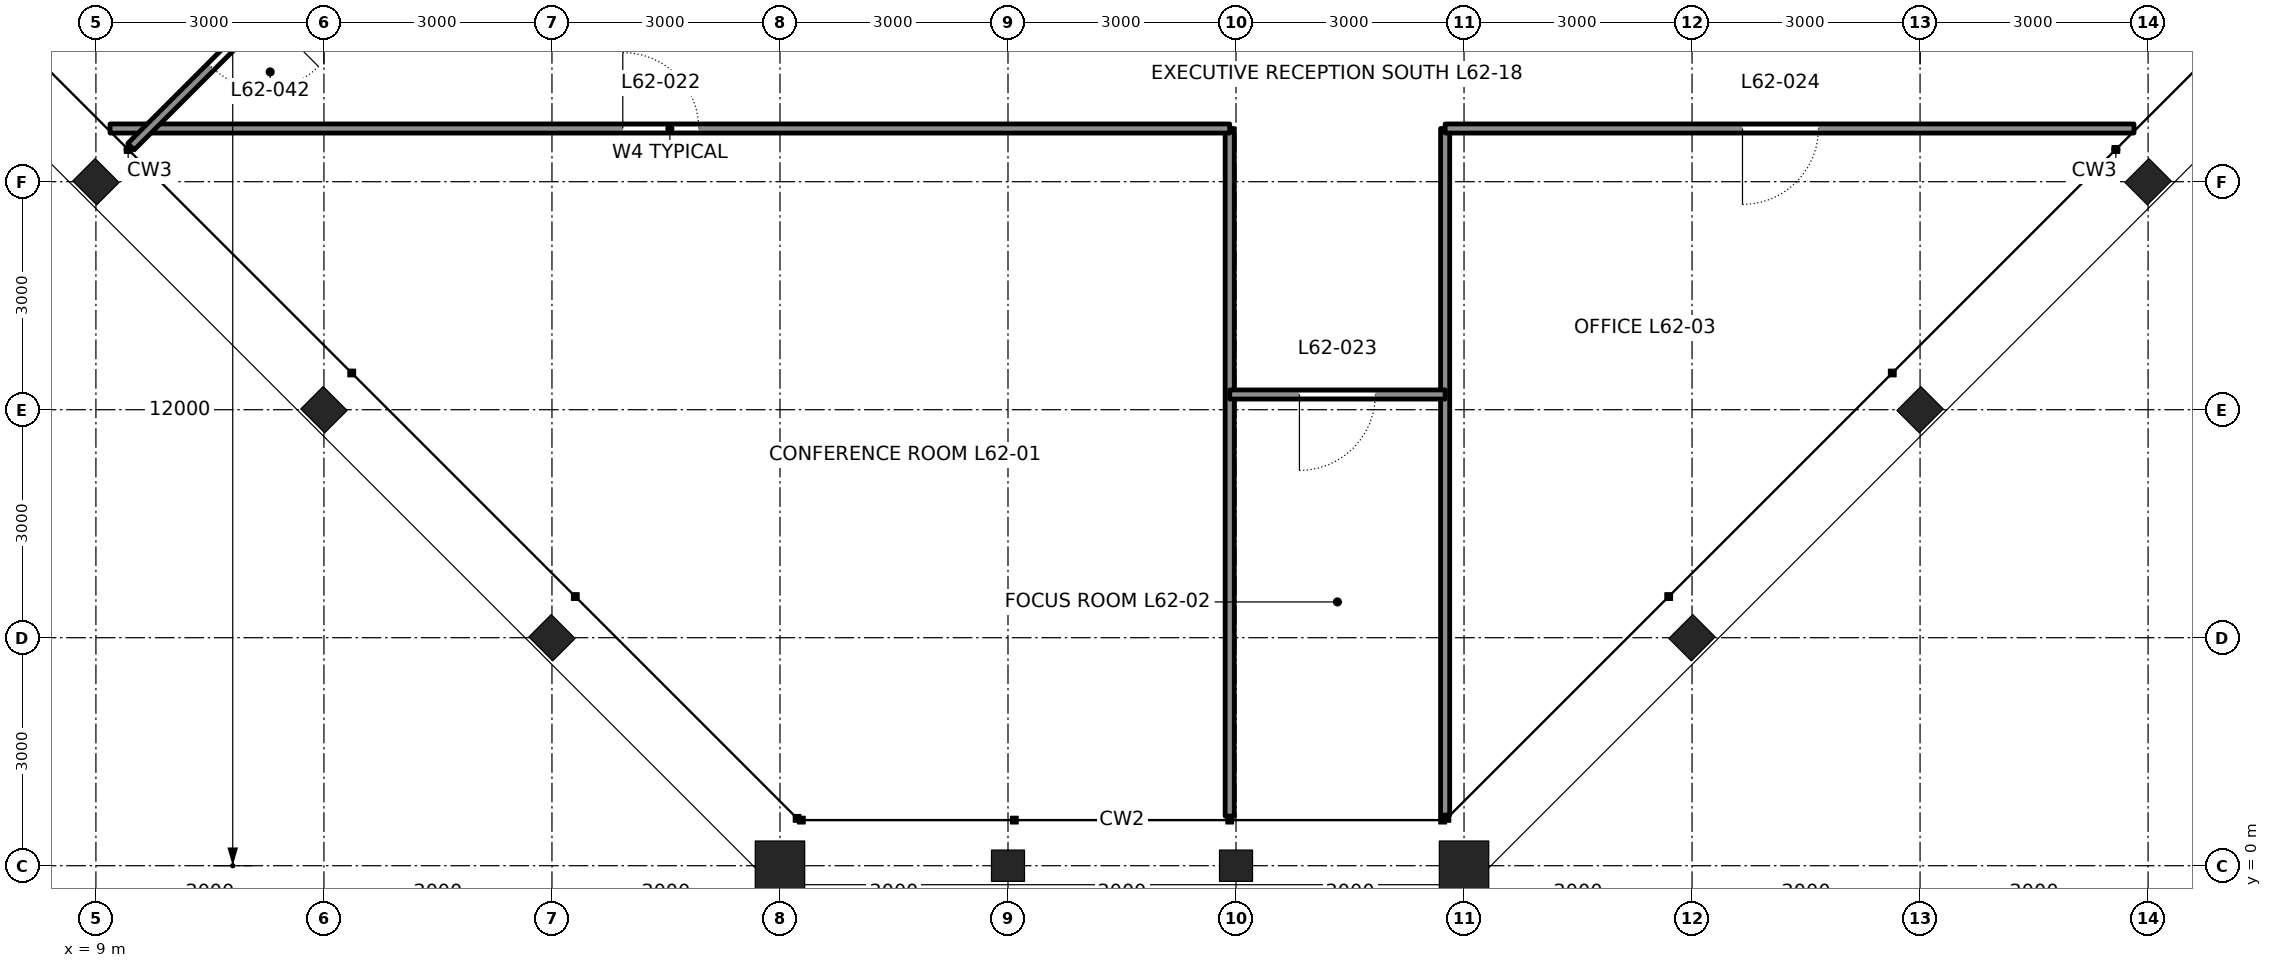
"""IFC4 building model, lengths in metres.
Left out: names, types, materials, properties, quantities, classifications, styles, units other than length and angle.
Written with IfcOpenShell. Run it as: python <this file> out.ifc"""

import sys

from ifc_helpers import new_model, si_unit, direction, frame, frame_2d, origin, origin_2d, place, context, subcontext, project, spatial, rectangle, hollow_rectangle, i_section, extrude, element, fill, save


model = new_model("IFC4")
c1 = context("Model", 3, precision=1e-05, world=origin(), true_north=direction((0.0, 1.0)))
c2 = subcontext(c1, "Body", "Model", "MODEL_VIEW")
j1 = project(units=[si_unit("LENGTHUNIT", "METRE"), si_unit("PLANEANGLEUNIT", "RADIAN")], contexts=[c1])
p1 = place(None, origin())
s1 = spatial("IfcSite", under=j1, at=p1, CompositionType="ELEMENT")
p2 = place(p1, origin())
s2 = spatial("IfcBuilding", under=s1, at=p2, CompositionType="ELEMENT")
p3 = place(p2, frame((0.0, 0.0, 279.0)))
s3 = spatial("IfcBuildingStorey", under=s2, at=p3, CompositionType="ELEMENT", Elevation=279.0)
p4 = place(p3, frame((18.0, 0.0, 0.0), z_axis=(0.0, 0.0, 1.0), x_axis=(0.0, -1.0, 0.0)))
e1 = element("IfcColumn", 1, at=p4, inside=s3, PredefinedType="COLUMN", context=c2, shape_type="SweptSolid", body=[
    extrude(hollow_rectangle(XDim=0.65, YDim=0.65, WallThickness=0.065, at=origin_2d()), origin(), (0.0, 0.0, 1.0), 4.2),
])
for number, where, z_axis, x_axis in (
    (2, (21.0, 0.0, 0.0), (0.0, 0.0, 1.0), (0.0, -1.0, 0.0)),
    (3, (24.0, 0.0, 0.0), (0.0, 0.0, 1.0), (0.0, -1.0, 0.0)),
):
    element("IfcColumn", number, at=place(p3, frame(where, z_axis=z_axis, x_axis=x_axis)), inside=s3, PredefinedType="COLUMN", context=c2, shape_type="SweptSolid", body=[
        extrude(i_section(OverallWidth=0.411, OverallDepth=0.434, WebThickness=0.036, FlangeThickness=0.057, at=origin_2d()), origin(), (0.0, 0.0, 1.0), 4.2),
    ])
p5 = place(p3, frame((27.0, 0.0, 0.0), z_axis=(0.0, 0.0, 1.0), x_axis=(0.0, -1.0, 0.0)))
e4 = element("IfcColumn", 4, at=p5, inside=s3, PredefinedType="COLUMN", context=c2, shape_type="SweptSolid", body=[
    extrude(hollow_rectangle(XDim=0.65, YDim=0.65, WallThickness=0.065, at=origin_2d()), origin(), (0.0, 0.0, 1.0), 4.2),
])
for number, where, z_axis, x_axis in (
    (5, (30.0, 3.0, 0.0), (0.0, 0.0, 1.0), (0.707, -0.707, 0.0)),
    (6, (33.0, 6.0, 0.0), (0.0, 0.0, 1.0), (0.707, -0.707, 0.0)),
    (7, (36.0, 9.0, 0.0), (0.0, 0.0, 1.0), (0.707, -0.707, 0.0)),
    (8, (9.0, 9.0, 0.0), (0.0, 0.0, 1.0), (-0.707, -0.707, 0.0)),
    (9, (12.0, 6.0, 0.0), (0.0, 0.0, 1.0), (-0.707, -0.707, 0.0)),
    (10, (15.0, 3.0, 0.0), (0.0, 0.0, 1.0), (-0.707, -0.707, 0.0)),
):
    element("IfcColumn", number, at=place(p3, frame(where, z_axis=z_axis, x_axis=x_axis)), inside=s3, PredefinedType="COLUMN", context=c2, shape_type="SweptSolid", body=[
        extrude(i_section(OverallWidth=0.417, OverallDepth=0.445, WebThickness=0.039, FlangeThickness=0.063, at=origin_2d()), origin(), (0.0, 0.0, 1.0), 4.2),
    ])
p6 = place(p3, frame((23.917, 0.653, 0.0), z_axis=(0.0, 0.0, 1.0), x_axis=(0.0, 1.0, 0.0)))
e11 = element("IfcWall", 11, at=p6, inside=s3, PredefinedType="PARTITIONING", context=c2, shape_type="SweptSolid", body=[
    extrude(rectangle(XDim=9.047, YDim=0.12, at=frame_2d((4.524, 0.0))), origin(), (0.0, 0.0, 1.0), 3.357),
])
p7 = place(p3, frame((26.751, 0.666, 0.0), z_axis=(0.0, 0.0, 1.0), x_axis=(0.0, 1.0, 0.0)))
e12 = element("IfcWall", 12, at=p7, inside=s3, PredefinedType="PARTITIONING", context=c2, shape_type="SweptSolid", body=[
    extrude(rectangle(XDim=9.034, YDim=0.12, at=frame_2d((4.517, 0.0))), origin(), (0.0, 0.0, 1.0), 4.04),
])
p8 = place(p3, frame((9.186, 9.7, 0.0), z_axis=(0.0, 0.0, 1.0), x_axis=(1.0, 0.0, 0.0)))
e13 = element("IfcWall", 13, at=p8, inside=s3, PredefinedType="PARTITIONING", context=c2, shape_type="SweptSolid", body=[
    extrude(rectangle(XDim=14.732, YDim=0.12, at=frame_2d((7.366, 0.0))), origin(), (0.0, 0.0, 1.0), 4.04),
])
p9 = place(p8, frame((6.747, 0.0, 0.0)))
e14 = element("IfcOpeningElement", 14, at=p9, cuts=e13, PredefinedType="OPENING", context=c2, shape_type="SweptSolid", body=[
    extrude(rectangle(XDim=1.0, YDim=2.4, at=frame_2d((0.5, 1.2))), frame((0.0, 0.07, 0.0), z_axis=(0.0, -1.0, 0.0), x_axis=(1.0, 0.0, 0.0)), (0.0, 0.0, 1.0), 0.14),
])
p10 = place(p3, frame((23.917, 6.2, 0.0), z_axis=(0.0, 0.0, 1.0), x_axis=(1.0, 0.0, 0.0)))
e15 = element("IfcWall", 15, at=p10, inside=s3, PredefinedType="PARTITIONING", context=c2, shape_type="SweptSolid", body=[
    extrude(rectangle(XDim=2.834, YDim=0.12, at=frame_2d((1.417, 0.0))), origin(), (0.0, 0.0, 1.0), 4.04),
])
p11 = place(p10, frame((0.917, 0.0, 0.0)))
e16 = element("IfcOpeningElement", 16, at=p11, cuts=e15, PredefinedType="OPENING", context=c2, shape_type="SweptSolid", body=[
    extrude(rectangle(XDim=1.0, YDim=2.4, at=frame_2d((0.5, 1.2))), frame((0.0, 0.07, 0.0), z_axis=(0.0, -1.0, 0.0), x_axis=(1.0, 0.0, 0.0)), (0.0, 0.0, 1.0), 0.14),
])
p12 = place(p3, frame((26.751, 9.7, 0.0), z_axis=(0.0, 0.0, 1.0), x_axis=(1.0, 0.0, 0.0)))
e17 = element("IfcWall", 17, at=p12, inside=s3, PredefinedType="PARTITIONING", context=c2, shape_type="SweptSolid", body=[
    extrude(rectangle(XDim=9.063, YDim=0.12, at=frame_2d((4.531, 0.0))), origin(), (0.0, 0.0, 1.0), 4.04),
])
p13 = place(p12, frame((3.912, 0.0, 0.0)))
e18 = element("IfcOpeningElement", 18, at=p13, cuts=e17, PredefinedType="OPENING", context=c2, shape_type="SweptSolid", body=[
    extrude(rectangle(XDim=1.0, YDim=2.4, at=frame_2d((0.5, 1.2))), frame((0.0, 0.07, 0.0), z_axis=(0.0, -1.0, 0.0), x_axis=(1.0, 0.0, 0.0)), (0.0, 0.0, 1.0), 0.14),
])
p14 = place(p3, frame((12.0, 12.0, 0.0), z_axis=(0.0, 0.0, 1.0), x_axis=(-0.707106781187, -0.707106781187, 0.0)))
e19 = element("IfcWall", 19, at=p14, inside=s3, PredefinedType="PARTITIONING", context=c2, shape_type="SweptSolid", body=[
    extrude(rectangle(XDim=3.59, YDim=0.12, at=frame_2d((1.795, 0.0))), origin(), (0.0, 0.0, 1.0), 4.04),
])
p15 = place(p14, frame((1.1, 0.0, 0.0)))
e20 = element("IfcOpeningElement", 20, at=p15, cuts=e19, PredefinedType="OPENING", context=c2, shape_type="SweptSolid", body=[
    extrude(rectangle(XDim=1.0, YDim=2.4, at=frame_2d((0.5, 1.2))), frame((0.0, 0.07, 0.0), z_axis=(0.0, -1.0, 0.0), x_axis=(1.0, 0.0, 0.0)), (0.0, 0.0, 1.0), 0.14),
])
p16 = place(p9, origin())
e21 = element("IfcDoor", 21, at=p16, inside=s3, OperationType="SINGLE_SWING_LEFT", PredefinedType="DOOR", context=c2, shape_type="SweptSolid", body=[
    extrude(rectangle(XDim=1.0, YDim=2.4, at=frame_2d((0.5, 1.2))), frame((0.0, 0.025, 0.0), z_axis=(0.0, -1.0, 0.0), x_axis=(1.0, 0.0, 0.0)), (0.0, 0.0, 1.0), 0.05),
])
fill(e14, e21)
p17 = place(p11, frame((1.0, 0.0, 0.0), z_axis=(0.0, 0.0, 1.0), x_axis=(-1.0, 0.0, 0.0)))
e22 = element("IfcDoor", 22, at=p17, inside=s3, OperationType="SINGLE_SWING_RIGHT", PredefinedType="DOOR", context=c2, shape_type="SweptSolid", body=[
    extrude(rectangle(XDim=1.0, YDim=2.4, at=frame_2d((0.5, 1.2))), frame((0.0, 0.025, 0.0), z_axis=(0.0, -1.0, 0.0), x_axis=(1.0, 0.0, 0.0)), (0.0, 0.0, 1.0), 0.05),
])
fill(e16, e22)
p18 = place(p13, frame((1.0, 0.0, 0.0), z_axis=(0.0, 0.0, 1.0), x_axis=(-1.0, 0.0, 0.0)))
e23 = element("IfcDoor", 23, at=p18, inside=s3, OperationType="SINGLE_SWING_RIGHT", PredefinedType="DOOR", context=c2, shape_type="SweptSolid", body=[
    extrude(rectangle(XDim=1.0, YDim=2.4, at=frame_2d((0.5, 1.2))), frame((0.0, 0.025, 0.0), z_axis=(0.0, -1.0, 0.0), x_axis=(1.0, 0.0, 0.0)), (0.0, 0.0, 1.0), 0.05),
])
fill(e18, e23)
p19 = place(p15, origin())
e24 = element("IfcDoor", 24, at=p19, inside=s3, OperationType="SINGLE_SWING_LEFT", PredefinedType="DOOR", context=c2, shape_type="SweptSolid", body=[
    extrude(rectangle(XDim=1.0, YDim=2.4, at=frame_2d((0.5, 1.2))), frame((0.0, 0.025, 0.0), z_axis=(0.0, -1.0, 0.0), x_axis=(1.0, 0.0, 0.0)), (0.0, 0.0, 1.0), 0.05),
])
fill(e20, e24)
save(model, sys.argv[1])
